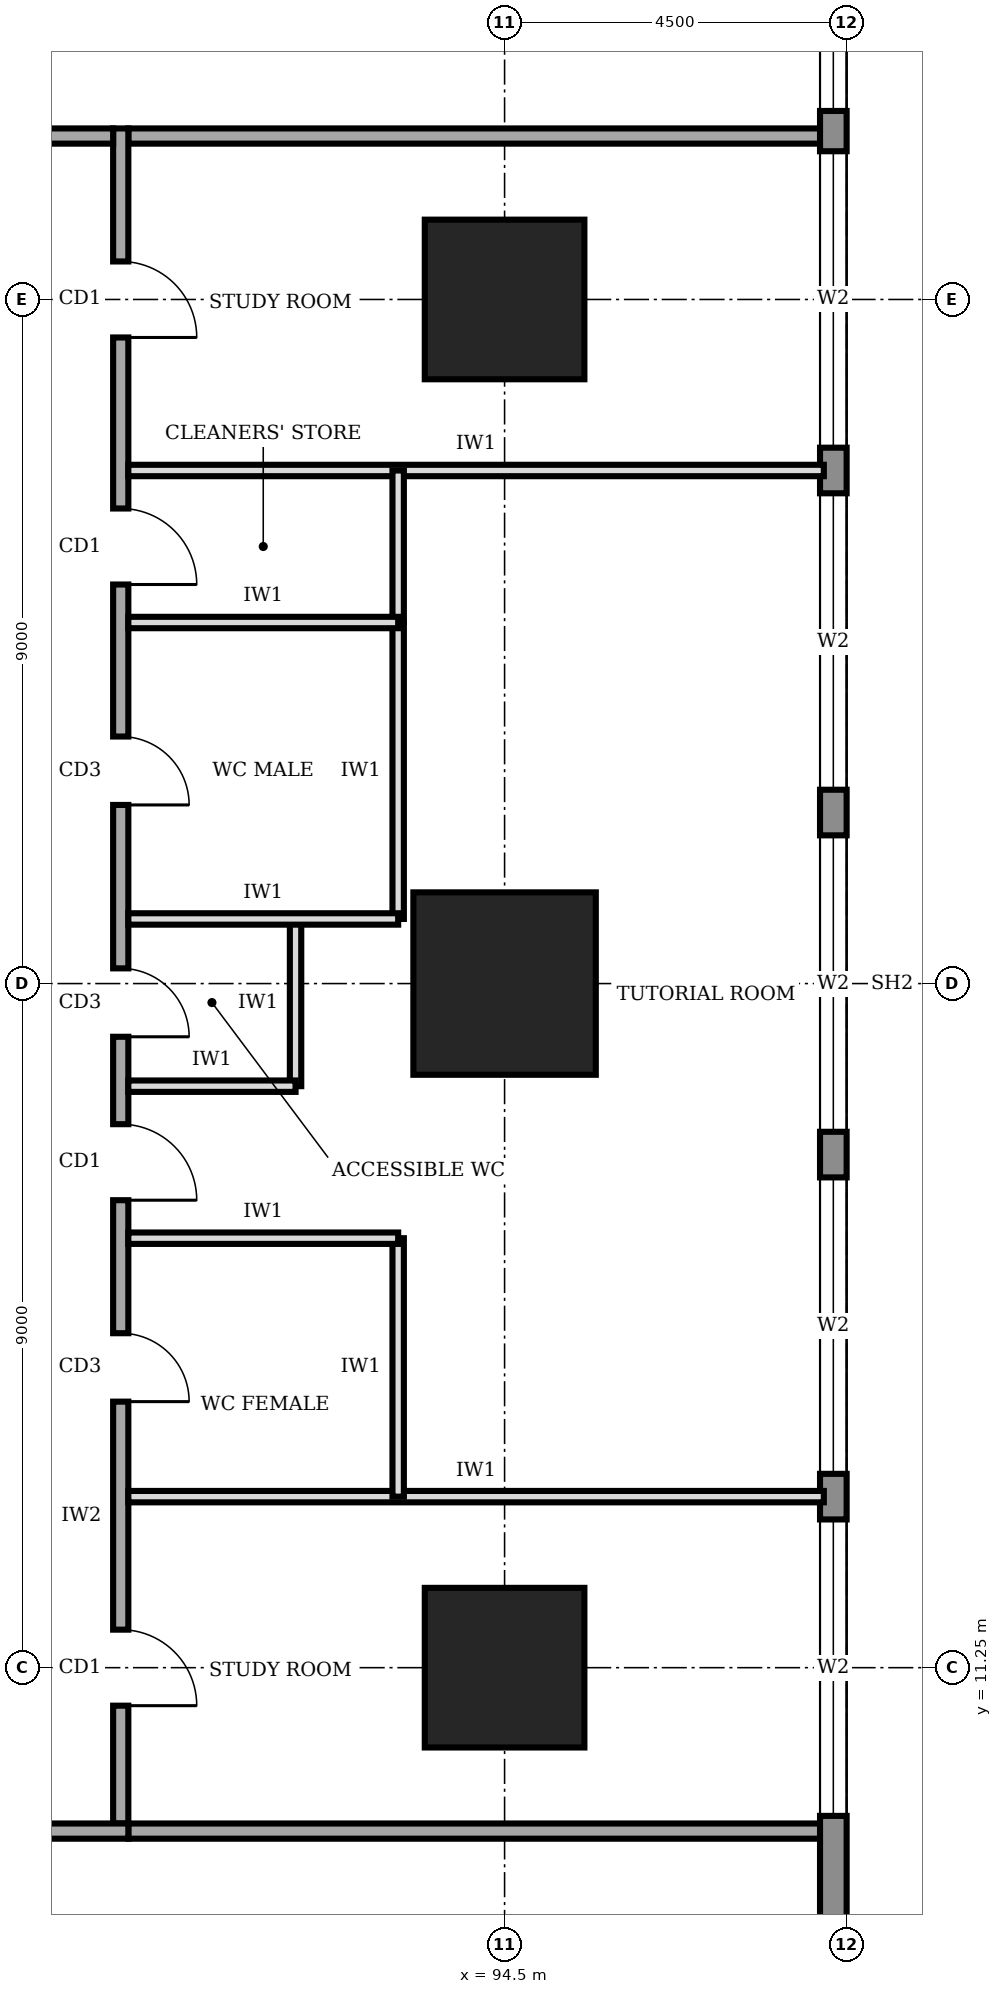
"""IFC4 building model, lengths in metres.
Left out: names, types, materials, properties, quantities, classifications, styles, units other than length and angle.
Written with IfcOpenShell. Run it as: python <this file> out.ifc"""

import sys

from ifc_helpers import new_model, si_unit, direction, frame, frame_2d, origin, origin_2d, place, context, subcontext, project, spatial, rectangle, extrude, element, fill, save


model = new_model("IFC4")
c1 = context("Model", 3, precision=1e-05, world=origin(), true_north=direction((0.0, 1.0)))
c2 = subcontext(c1, "Body", "Model", "MODEL_VIEW")
j1 = project(units=[si_unit("LENGTHUNIT", "METRE"), si_unit("PLANEANGLEUNIT", "RADIAN")], contexts=[c1])
p1 = place(None, origin())
s1 = spatial("IfcSite", under=j1, at=p1, CompositionType="ELEMENT")
p2 = place(p1, origin())
s2 = spatial("IfcBuilding", under=s1, at=p2, CompositionType="ELEMENT")
p3 = place(p2, frame((0.0, 0.0, 73.0)))
s3 = spatial("IfcBuildingStorey", under=s2, at=p3, CompositionType="ELEMENT", Elevation=73.0)
p4 = place(p3, frame((94.5, 11.25, 0.0), z_axis=(0.0, 0.0, 1.0), x_axis=(1.0, 0.0, 0.0)))
e1 = element("IfcColumn", 1, at=p4, inside=s3, PredefinedType="COLUMN", context=c2, shape_type="SweptSolid", body=[
    extrude(rectangle(XDim=2.1, YDim=2.1, at=origin_2d()), origin(), (0.0, 0.0, 1.0), 4.0),
])
p5 = place(p3, frame((94.5, 20.25, 0.0), z_axis=(0.0, 0.0, 1.0), x_axis=(1.0, 0.0, 0.0)))
e2 = element("IfcColumn", 2, at=p5, inside=s3, PredefinedType="COLUMN", context=c2, shape_type="SweptSolid", body=[
    extrude(rectangle(XDim=2.4, YDim=2.4, at=origin_2d()), origin(), (0.0, 0.0, 1.0), 4.0),
])
p6 = place(p3, frame((94.5, 29.25, 0.0), z_axis=(0.0, 0.0, 1.0), x_axis=(1.0, 0.0, 0.0)))
e3 = element("IfcColumn", 3, at=p6, inside=s3, PredefinedType="COLUMN", context=c2, shape_type="SweptSolid", body=[
    extrude(rectangle(XDim=2.1, YDim=2.1, at=origin_2d()), origin(), (0.0, 0.0, 1.0), 4.0),
])
p7 = place(p3, frame((98.825, 4.52, 0.0), z_axis=(0.0, 0.0, 1.0), x_axis=(0.0, 1.0, 0.0)))
e4 = element("IfcWall", 4, at=p7, inside=s3, PredefinedType="STANDARD", context=c2, shape_type="SweptSolid", body=[
    extrude(rectangle(XDim=31.46, YDim=0.35, at=frame_2d((15.73, 0.0))), origin(), (0.0, 0.0, 1.0), 3.75),
])
p8 = place(p7, frame((4.78, 0.0, 0.6)))
e5 = element("IfcOpeningElement", 5, at=p8, cuts=e4, PredefinedType="OPENING", context=c2, shape_type="SweptSolid", body=[
    extrude(rectangle(XDim=3.9, YDim=2.6, at=frame_2d((1.95, 1.3))), frame((0.0, 0.185, 0.0), z_axis=(0.0, -1.0, 0.0), x_axis=(1.0, 0.0, 0.0)), (0.0, 0.0, 1.0), 0.37),
])
p9 = place(p7, frame((9.28, 0.0, 0.6)))
e6 = element("IfcOpeningElement", 6, at=p9, cuts=e4, PredefinedType="OPENING", context=c2, shape_type="SweptSolid", body=[
    extrude(rectangle(XDim=3.9, YDim=2.6, at=frame_2d((1.95, 1.3))), frame((0.0, 0.185, 0.0), z_axis=(0.0, -1.0, 0.0), x_axis=(1.0, 0.0, 0.0)), (0.0, 0.0, 1.0), 0.37),
])
p10 = place(p7, frame((13.78, 0.0, 0.6)))
e7 = element("IfcOpeningElement", 7, at=p10, cuts=e4, PredefinedType="OPENING", context=c2, shape_type="SweptSolid", body=[
    extrude(rectangle(XDim=3.9, YDim=2.6, at=frame_2d((1.95, 1.3))), frame((0.0, 0.185, 0.0), z_axis=(0.0, -1.0, 0.0), x_axis=(1.0, 0.0, 0.0)), (0.0, 0.0, 1.0), 0.37),
])
p11 = place(p7, frame((18.28, 0.0, 0.6)))
e8 = element("IfcOpeningElement", 8, at=p11, cuts=e4, PredefinedType="OPENING", context=c2, shape_type="SweptSolid", body=[
    extrude(rectangle(XDim=3.9, YDim=2.6, at=frame_2d((1.95, 1.3))), frame((0.0, 0.185, 0.0), z_axis=(0.0, -1.0, 0.0), x_axis=(1.0, 0.0, 0.0)), (0.0, 0.0, 1.0), 0.37),
])
p12 = place(p7, frame((22.78, 0.0, 0.6)))
e9 = element("IfcOpeningElement", 9, at=p12, cuts=e4, PredefinedType="OPENING", context=c2, shape_type="SweptSolid", body=[
    extrude(rectangle(XDim=3.9, YDim=2.6, at=frame_2d((1.95, 1.3))), frame((0.0, 0.185, 0.0), z_axis=(0.0, -1.0, 0.0), x_axis=(1.0, 0.0, 0.0)), (0.0, 0.0, 1.0), 0.37),
])
p13 = place(p7, frame((27.21, 0.0, 0.6)))
e10 = element("IfcOpeningElement", 10, at=p13, cuts=e4, PredefinedType="OPENING", context=c2, shape_type="SweptSolid", body=[
    extrude(rectangle(XDim=3.9, YDim=2.6, at=frame_2d((1.95, 1.3))), frame((0.0, 0.185, 0.0), z_axis=(0.0, -1.0, 0.0), x_axis=(1.0, 0.0, 0.0)), (0.0, 0.0, 1.0), 0.37),
])
p14 = place(p3, frame((72.65, 9.1, 0.0), z_axis=(0.0, 0.0, 1.0), x_axis=(1.0, 0.0, 0.0)))
e11 = element("IfcWall", 11, at=p14, inside=s3, PredefinedType="SOLIDWALL", context=c2, shape_type="SweptSolid", body=[
    extrude(rectangle(XDim=16.9, YDim=0.2, at=frame_2d((8.45, 0.0))), origin(), (0.0, 0.0, 1.0), 3.75),
])
p15 = place(p14, frame((0.925, 0.0, 0.0)))
e12 = element("IfcOpeningElement", 12, at=p15, cuts=e11, PredefinedType="OPENING", context=c2, shape_type="SweptSolid", body=[
    extrude(rectangle(XDim=1.8, YDim=2.1, at=frame_2d((0.9, 1.05))), frame((0.0, 0.11, 0.0), z_axis=(0.0, -1.0, 0.0), x_axis=(1.0, 0.0, 0.0)), (0.0, 0.0, 1.0), 0.22),
])
p16 = place(p14, frame((7.85, 0.0, 0.0)))
e13 = element("IfcOpeningElement", 13, at=p16, cuts=e11, PredefinedType="OPENING", context=c2, shape_type="SweptSolid", body=[
    extrude(rectangle(XDim=1.0, YDim=2.1, at=frame_2d((0.5, 1.05))), frame((0.0, 0.11, 0.0), z_axis=(0.0, -1.0, 0.0), x_axis=(1.0, 0.0, 0.0)), (0.0, 0.0, 1.0), 0.22),
])
p17 = place(p14, frame((13.975, 0.0, 0.0)))
e14 = element("IfcOpeningElement", 14, at=p17, cuts=e11, PredefinedType="OPENING", context=c2, shape_type="SweptSolid", body=[
    extrude(rectangle(XDim=1.8, YDim=2.1, at=frame_2d((0.9, 1.05))), frame((0.0, 0.11, 0.0), z_axis=(0.0, -1.0, 0.0), x_axis=(1.0, 0.0, 0.0)), (0.0, 0.0, 1.0), 0.22),
])
p18 = place(p3, frame((89.45, 9.2, 0.0), z_axis=(0.0, 0.0, 1.0), x_axis=(0.0, 1.0, 0.0)))
e15 = element("IfcWall", 15, at=p18, inside=s3, PredefinedType="SOLIDWALL", context=c2, shape_type="SweptSolid", body=[
    extrude(rectangle(XDim=22.3, YDim=0.2, at=frame_2d((11.15, 0.0))), origin(), (0.0, 0.0, 1.0), 3.75),
])
p19 = place(p18, frame((1.55, 0.0, 0.0)))
e16 = element("IfcOpeningElement", 16, at=p19, cuts=e15, PredefinedType="OPENING", context=c2, shape_type="SweptSolid", body=[
    extrude(rectangle(XDim=1.0, YDim=2.1, at=frame_2d((0.5, 1.05))), frame((0.0, 0.11, 0.0), z_axis=(0.0, -1.0, 0.0), x_axis=(1.0, 0.0, 0.0)), (0.0, 0.0, 1.0), 0.22),
])
p20 = place(p18, frame((5.55, 0.0, 0.0)))
e17 = element("IfcOpeningElement", 17, at=p20, cuts=e15, PredefinedType="OPENING", context=c2, shape_type="SweptSolid", body=[
    extrude(rectangle(XDim=0.9, YDim=2.1, at=frame_2d((0.45, 1.05))), frame((0.0, 0.11, 0.0), z_axis=(0.0, -1.0, 0.0), x_axis=(1.0, 0.0, 0.0)), (0.0, 0.0, 1.0), 0.22),
])
p21 = place(p18, frame((10.35, 0.0, 0.0)))
e18 = element("IfcOpeningElement", 18, at=p21, cuts=e15, PredefinedType="OPENING", context=c2, shape_type="SweptSolid", body=[
    extrude(rectangle(XDim=0.9, YDim=2.1, at=frame_2d((0.45, 1.05))), frame((0.0, 0.11, 0.0), z_axis=(0.0, -1.0, 0.0), x_axis=(1.0, 0.0, 0.0)), (0.0, 0.0, 1.0), 0.22),
])
p22 = place(p18, frame((13.4, 0.0, 0.0)))
e19 = element("IfcOpeningElement", 19, at=p22, cuts=e15, PredefinedType="OPENING", context=c2, shape_type="SweptSolid", body=[
    extrude(rectangle(XDim=0.9, YDim=2.1, at=frame_2d((0.45, 1.05))), frame((0.0, 0.11, 0.0), z_axis=(0.0, -1.0, 0.0), x_axis=(1.0, 0.0, 0.0)), (0.0, 0.0, 1.0), 0.22),
])
p23 = place(p18, frame((16.3, 0.0, 0.0)))
e20 = element("IfcOpeningElement", 20, at=p23, cuts=e15, PredefinedType="OPENING", context=c2, shape_type="SweptSolid", body=[
    extrude(rectangle(XDim=1.0, YDim=2.1, at=frame_2d((0.5, 1.05))), frame((0.0, 0.11, 0.0), z_axis=(0.0, -1.0, 0.0), x_axis=(1.0, 0.0, 0.0)), (0.0, 0.0, 1.0), 0.22),
])
p24 = place(p18, frame((8.2, 0.0, 0.0)))
e21 = element("IfcOpeningElement", 21, at=p24, cuts=e15, PredefinedType="OPENING", context=c2, shape_type="SweptSolid", body=[
    extrude(rectangle(XDim=1.0, YDim=2.1, at=frame_2d((0.5, 1.05))), frame((0.0, 0.11, 0.0), z_axis=(0.0, -1.0, 0.0), x_axis=(1.0, 0.0, 0.0)), (0.0, 0.0, 1.0), 0.22),
])
p25 = place(p18, frame((19.55, 0.0, 0.0)))
e22 = element("IfcOpeningElement", 22, at=p25, cuts=e15, PredefinedType="OPENING", context=c2, shape_type="SweptSolid", body=[
    extrude(rectangle(XDim=1.0, YDim=2.1, at=frame_2d((0.5, 1.05))), frame((0.0, 0.11, 0.0), z_axis=(0.0, -1.0, 0.0), x_axis=(1.0, 0.0, 0.0)), (0.0, 0.0, 1.0), 0.22),
])
p26 = place(p3, frame((89.35, 31.4, 0.0), z_axis=(0.0, 0.0, 1.0), x_axis=(-1.0, 0.0, 0.0)))
e23 = element("IfcWall", 23, at=p26, inside=s3, PredefinedType="SOLIDWALL", context=c2, shape_type="SweptSolid", body=[
    extrude(rectangle(XDim=16.9, YDim=0.2, at=frame_2d((8.45, 0.0))), origin(), (0.0, 0.0, 1.0), 3.75),
])
p27 = place(p26, frame((13.975, 0.0, 0.0)))
e24 = element("IfcOpeningElement", 24, at=p27, cuts=e23, PredefinedType="OPENING", context=c2, shape_type="SweptSolid", body=[
    extrude(rectangle(XDim=1.8, YDim=2.1, at=frame_2d((0.9, 1.05))), frame((0.0, 0.11, 0.0), z_axis=(0.0, -1.0, 0.0), x_axis=(1.0, 0.0, 0.0)), (0.0, 0.0, 1.0), 0.22),
])
p28 = place(p26, frame((7.85, 0.0, 0.0)))
e25 = element("IfcOpeningElement", 25, at=p28, cuts=e23, PredefinedType="OPENING", context=c2, shape_type="SweptSolid", body=[
    extrude(rectangle(XDim=1.0, YDim=2.1, at=frame_2d((0.5, 1.05))), frame((0.0, 0.11, 0.0), z_axis=(0.0, -1.0, 0.0), x_axis=(1.0, 0.0, 0.0)), (0.0, 0.0, 1.0), 0.22),
])
p29 = place(p26, frame((0.925, 0.0, 0.0)))
e26 = element("IfcOpeningElement", 26, at=p29, cuts=e23, PredefinedType="OPENING", context=c2, shape_type="SweptSolid", body=[
    extrude(rectangle(XDim=1.8, YDim=2.1, at=frame_2d((0.9, 1.05))), frame((0.0, 0.11, 0.0), z_axis=(0.0, -1.0, 0.0), x_axis=(1.0, 0.0, 0.0)), (0.0, 0.0, 1.0), 0.22),
])
for number, where, z_axis, x_axis in (
    (27, (89.55, 9.1, 0.0), (0.0, 0.0, 1.0), (1.0, 0.0, 0.0)),
    (28, (89.55, 31.4, 0.0), (0.0, 0.0, 1.0), (1.0, 0.0, 0.0)),
):
    element("IfcWall", number, at=place(p3, frame(where, z_axis=z_axis, x_axis=x_axis)), inside=s3, PredefinedType="SOLIDWALL", context=c2, shape_type="SweptSolid", body=[
        extrude(rectangle(XDim=9.15, YDim=0.2, at=frame_2d((4.575, 0.0))), origin(), (0.0, 0.0, 1.0), 3.75),
    ])
for number, where, z_axis, x_axis in (
    (29, (89.55, 13.5, 0.0), (0.0, 0.0, 1.0), (1.0, 0.0, 0.0)),
    (30, (89.55, 27.0, 0.0), (0.0, 0.0, 1.0), (1.0, 0.0, 0.0)),
):
    element("IfcWall", number, at=place(p3, frame(where, z_axis=z_axis, x_axis=x_axis)), inside=s3, PredefinedType="PARTITIONING", context=c2, shape_type="SweptSolid", body=[
        extrude(rectangle(XDim=9.15, YDim=0.15, at=frame_2d((4.575, 0.0))), origin(), (0.0, 0.0, 1.0), 3.75),
    ])
p30 = place(p3, frame((89.55, 16.9, 0.0), z_axis=(0.0, 0.0, 1.0), x_axis=(1.0, 0.0, 0.0)))
e31 = element("IfcWall", 31, at=p30, inside=s3, PredefinedType="PARTITIONING", context=c2, shape_type="SweptSolid", body=[
    extrude(rectangle(XDim=3.55, YDim=0.15, at=frame_2d((1.775, 0.0))), origin(), (0.0, 0.0, 1.0), 3.75),
])
p31 = place(p3, frame((89.55, 18.9, 0.0), z_axis=(0.0, 0.0, 1.0), x_axis=(1.0, 0.0, 0.0)))
e32 = element("IfcWall", 32, at=p31, inside=s3, PredefinedType="PARTITIONING", context=c2, shape_type="SweptSolid", body=[
    extrude(rectangle(XDim=2.2, YDim=0.15, at=frame_2d((1.1, 0.0))), origin(), (0.0, 0.0, 1.0), 3.75),
])
for number, where, z_axis, x_axis in (
    (33, (89.55, 21.1, 0.0), (0.0, 0.0, 1.0), (1.0, 0.0, 0.0)),
    (34, (89.55, 25.0, 0.0), (0.0, 0.0, 1.0), (1.0, 0.0, 0.0)),
):
    element("IfcWall", number, at=place(p3, frame(where, z_axis=z_axis, x_axis=x_axis)), inside=s3, PredefinedType="PARTITIONING", context=c2, shape_type="SweptSolid", body=[
        extrude(rectangle(XDim=3.55, YDim=0.15, at=frame_2d((1.775, 0.0))), origin(), (0.0, 0.0, 1.0), 3.75),
    ])
p32 = place(p3, frame((93.1, 13.5, 0.0), z_axis=(0.0, 0.0, 1.0), x_axis=(0.0, 1.0, 0.0)))
e35 = element("IfcWall", 35, at=p32, inside=s3, PredefinedType="PARTITIONING", context=c2, shape_type="SweptSolid", body=[
    extrude(rectangle(XDim=3.4, YDim=0.15, at=frame_2d((1.7, 0.0))), origin(), (0.0, 0.0, 1.0), 3.75),
])
p33 = place(p3, frame((91.75, 18.9, 0.0), z_axis=(0.0, 0.0, 1.0), x_axis=(0.0, 1.0, 0.0)))
e36 = element("IfcWall", 36, at=p33, inside=s3, PredefinedType="PARTITIONING", context=c2, shape_type="SweptSolid", body=[
    extrude(rectangle(XDim=2.2, YDim=0.15, at=frame_2d((1.1, 0.0))), origin(), (0.0, 0.0, 1.0), 3.75),
])
p34 = place(p3, frame((93.1, 21.1, 0.0), z_axis=(0.0, 0.0, 1.0), x_axis=(0.0, 1.0, 0.0)))
e37 = element("IfcWall", 37, at=p34, inside=s3, PredefinedType="PARTITIONING", context=c2, shape_type="SweptSolid", body=[
    extrude(rectangle(XDim=3.9, YDim=0.15, at=frame_2d((1.95, 0.0))), origin(), (0.0, 0.0, 1.0), 3.75),
])
p35 = place(p3, frame((93.1, 25.0, 0.0), z_axis=(0.0, 0.0, 1.0), x_axis=(0.0, 1.0, 0.0)))
e38 = element("IfcWall", 38, at=p35, inside=s3, PredefinedType="PARTITIONING", context=c2, shape_type="SweptSolid", body=[
    extrude(rectangle(XDim=2.0, YDim=0.15, at=frame_2d((1.0, 0.0))), origin(), (0.0, 0.0, 1.0), 3.75),
])
p36 = place(p8, origin())
e39 = element("IfcWindow", 39, at=p36, inside=s3, PartitioningType="SINGLE_PANEL", PredefinedType="WINDOW", context=c2, shape_type="SweptSolid", body=[
    extrude(rectangle(XDim=3.9, YDim=2.6, at=frame_2d((1.95, 1.3))), frame((0.0, 0.03, 0.0), z_axis=(0.0, -1.0, 0.0), x_axis=(1.0, 0.0, 0.0)), (0.0, 0.0, 1.0), 0.06),
])
fill(e5, e39)
p37 = place(p9, origin())
e40 = element("IfcWindow", 40, at=p37, inside=s3, PartitioningType="SINGLE_PANEL", PredefinedType="WINDOW", context=c2, shape_type="SweptSolid", body=[
    extrude(rectangle(XDim=3.9, YDim=2.6, at=frame_2d((1.95, 1.3))), frame((0.0, 0.03, 0.0), z_axis=(0.0, -1.0, 0.0), x_axis=(1.0, 0.0, 0.0)), (0.0, 0.0, 1.0), 0.06),
])
fill(e6, e40)
p38 = place(p10, origin())
e41 = element("IfcWindow", 41, at=p38, inside=s3, PartitioningType="SINGLE_PANEL", PredefinedType="WINDOW", context=c2, shape_type="SweptSolid", body=[
    extrude(rectangle(XDim=3.9, YDim=2.6, at=frame_2d((1.95, 1.3))), frame((0.0, 0.03, 0.0), z_axis=(0.0, -1.0, 0.0), x_axis=(1.0, 0.0, 0.0)), (0.0, 0.0, 1.0), 0.06),
])
fill(e7, e41)
p39 = place(p11, origin())
e42 = element("IfcWindow", 42, at=p39, inside=s3, PartitioningType="SINGLE_PANEL", PredefinedType="WINDOW", context=c2, shape_type="SweptSolid", body=[
    extrude(rectangle(XDim=3.9, YDim=2.6, at=frame_2d((1.95, 1.3))), frame((0.0, 0.03, 0.0), z_axis=(0.0, -1.0, 0.0), x_axis=(1.0, 0.0, 0.0)), (0.0, 0.0, 1.0), 0.06),
])
fill(e8, e42)
p40 = place(p12, origin())
e43 = element("IfcWindow", 43, at=p40, inside=s3, PartitioningType="SINGLE_PANEL", PredefinedType="WINDOW", context=c2, shape_type="SweptSolid", body=[
    extrude(rectangle(XDim=3.9, YDim=2.6, at=frame_2d((1.95, 1.3))), frame((0.0, 0.03, 0.0), z_axis=(0.0, -1.0, 0.0), x_axis=(1.0, 0.0, 0.0)), (0.0, 0.0, 1.0), 0.06),
])
fill(e9, e43)
p41 = place(p13, origin())
e44 = element("IfcWindow", 44, at=p41, inside=s3, PartitioningType="SINGLE_PANEL", PredefinedType="WINDOW", context=c2, shape_type="SweptSolid", body=[
    extrude(rectangle(XDim=3.9, YDim=2.6, at=frame_2d((1.95, 1.3))), frame((0.0, 0.03, 0.0), z_axis=(0.0, -1.0, 0.0), x_axis=(1.0, 0.0, 0.0)), (0.0, 0.0, 1.0), 0.06),
])
fill(e10, e44)
p42 = place(p19, frame((1.0, 0.0, 0.0), z_axis=(0.0, 0.0, 1.0), x_axis=(-1.0, 0.0, 0.0)))
e45 = element("IfcDoor", 45, at=p42, inside=s3, OperationType="SINGLE_SWING_RIGHT", PredefinedType="DOOR", context=c2, shape_type="SweptSolid", body=[
    extrude(rectangle(XDim=1.0, YDim=2.1, at=frame_2d((0.5, 1.05))), frame((0.0, 0.025, 0.0), z_axis=(0.0, -1.0, 0.0), x_axis=(1.0, 0.0, 0.0)), (0.0, 0.0, 1.0), 0.05),
])
fill(e16, e45)
p43 = place(p20, frame((0.9, 0.0, 0.0), z_axis=(0.0, 0.0, 1.0), x_axis=(-1.0, 0.0, 0.0)))
e46 = element("IfcDoor", 46, at=p43, inside=s3, OperationType="SINGLE_SWING_RIGHT", PredefinedType="DOOR", context=c2, shape_type="SweptSolid", body=[
    extrude(rectangle(XDim=0.9, YDim=2.1, at=frame_2d((0.45, 1.05))), frame((0.0, 0.025, 0.0), z_axis=(0.0, -1.0, 0.0), x_axis=(1.0, 0.0, 0.0)), (0.0, 0.0, 1.0), 0.05),
])
fill(e17, e46)
p44 = place(p21, frame((0.9, 0.0, 0.0), z_axis=(0.0, 0.0, 1.0), x_axis=(-1.0, 0.0, 0.0)))
e47 = element("IfcDoor", 47, at=p44, inside=s3, OperationType="SINGLE_SWING_RIGHT", PredefinedType="DOOR", context=c2, shape_type="SweptSolid", body=[
    extrude(rectangle(XDim=0.9, YDim=2.1, at=frame_2d((0.45, 1.05))), frame((0.0, 0.025, 0.0), z_axis=(0.0, -1.0, 0.0), x_axis=(1.0, 0.0, 0.0)), (0.0, 0.0, 1.0), 0.05),
])
fill(e18, e47)
p45 = place(p22, frame((0.9, 0.0, 0.0), z_axis=(0.0, 0.0, 1.0), x_axis=(-1.0, 0.0, 0.0)))
e48 = element("IfcDoor", 48, at=p45, inside=s3, OperationType="SINGLE_SWING_RIGHT", PredefinedType="DOOR", context=c2, shape_type="SweptSolid", body=[
    extrude(rectangle(XDim=0.9, YDim=2.1, at=frame_2d((0.45, 1.05))), frame((0.0, 0.025, 0.0), z_axis=(0.0, -1.0, 0.0), x_axis=(1.0, 0.0, 0.0)), (0.0, 0.0, 1.0), 0.05),
])
fill(e19, e48)
p46 = place(p23, frame((1.0, 0.0, 0.0), z_axis=(0.0, 0.0, 1.0), x_axis=(-1.0, 0.0, 0.0)))
e49 = element("IfcDoor", 49, at=p46, inside=s3, OperationType="SINGLE_SWING_RIGHT", PredefinedType="DOOR", context=c2, shape_type="SweptSolid", body=[
    extrude(rectangle(XDim=1.0, YDim=2.1, at=frame_2d((0.5, 1.05))), frame((0.0, 0.025, 0.0), z_axis=(0.0, -1.0, 0.0), x_axis=(1.0, 0.0, 0.0)), (0.0, 0.0, 1.0), 0.05),
])
fill(e20, e49)
p47 = place(p24, frame((1.0, 0.0, 0.0), z_axis=(0.0, 0.0, 1.0), x_axis=(-1.0, 0.0, 0.0)))
e50 = element("IfcDoor", 50, at=p47, inside=s3, OperationType="SINGLE_SWING_RIGHT", PredefinedType="DOOR", context=c2, shape_type="SweptSolid", body=[
    extrude(rectangle(XDim=1.0, YDim=2.1, at=frame_2d((0.5, 1.05))), frame((0.0, 0.025, 0.0), z_axis=(0.0, -1.0, 0.0), x_axis=(1.0, 0.0, 0.0)), (0.0, 0.0, 1.0), 0.05),
])
fill(e21, e50)
p48 = place(p25, frame((1.0, 0.0, 0.0), z_axis=(0.0, 0.0, 1.0), x_axis=(-1.0, 0.0, 0.0)))
e51 = element("IfcDoor", 51, at=p48, inside=s3, OperationType="SINGLE_SWING_RIGHT", PredefinedType="DOOR", context=c2, shape_type="SweptSolid", body=[
    extrude(rectangle(XDim=1.0, YDim=2.1, at=frame_2d((0.5, 1.05))), frame((0.0, 0.025, 0.0), z_axis=(0.0, -1.0, 0.0), x_axis=(1.0, 0.0, 0.0)), (0.0, 0.0, 1.0), 0.05),
])
fill(e22, e51)
save(model, sys.argv[1])
